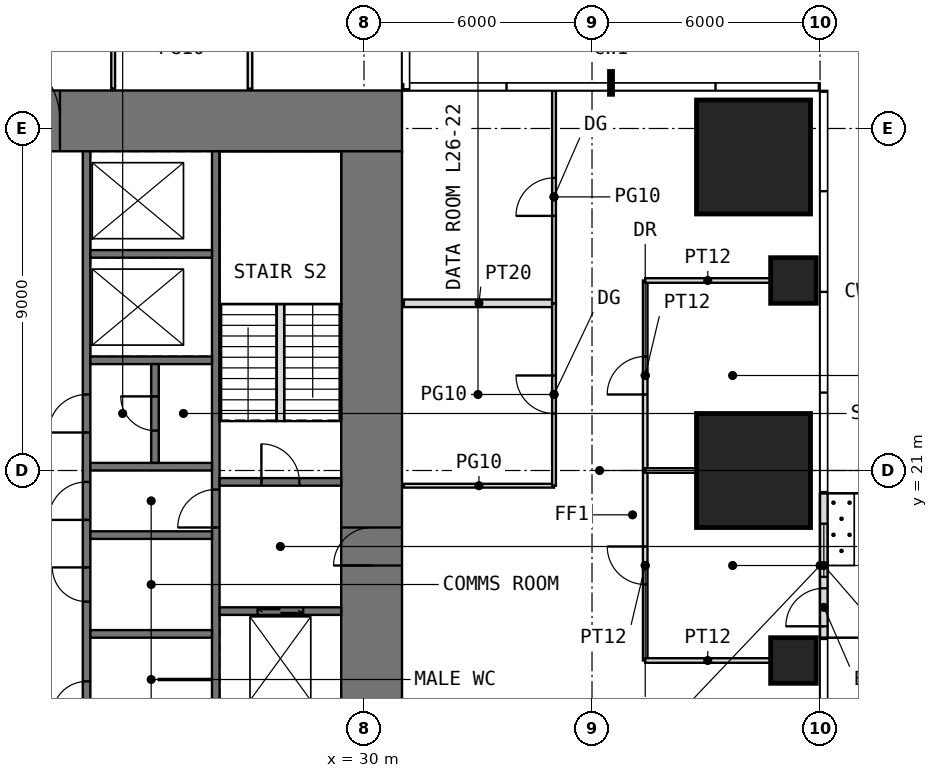
"""IFC4 building model, lengths in metres.
Left out: names, types, materials, properties, quantities, classifications, styles, units other than length and angle.
Written with IfcOpenShell. Run it as: python <this file> out.ifc"""

import sys

from ifc_helpers import new_model, si_unit, direction, frame, frame_2d, origin, origin_2d, place, context, subcontext, project, spatial, rectangle, extrude, element, fill, save


model = new_model("IFC4")
c1 = context("Model", 3, precision=1e-05, world=origin(), true_north=direction((0.0, 1.0)))
c2 = subcontext(c1, "Body", "Model", "MODEL_VIEW")
j1 = project(units=[si_unit("LENGTHUNIT", "METRE"), si_unit("PLANEANGLEUNIT", "RADIAN")], contexts=[c1])
p1 = place(None, origin())
s1 = spatial("IfcSite", under=j1, at=p1, CompositionType="ELEMENT")
p2 = place(p1, origin())
s2 = spatial("IfcBuilding", under=s1, at=p2, CompositionType="ELEMENT")
p3 = place(p2, frame((0.0, 0.0, 112.5)))
s3 = spatial("IfcBuildingStorey", under=s2, at=p3, CompositionType="ELEMENT", Elevation=112.5)
p4 = place(p3, frame((41.3, 16.0, 0.0), z_axis=(0.0, 0.0, 1.0), x_axis=(1.0, 0.0, 0.0)))
e1 = element("IfcColumn", 1, at=p4, inside=s3, PredefinedType="COLUMN", context=c2, shape_type="SweptSolid", body=[
    extrude(rectangle(XDim=1.2, YDim=1.2, at=origin_2d()), origin(), (0.0, 0.0, 1.0), 4.0),
])
p5 = place(p3, frame((40.25, 21.0, 0.0), z_axis=(0.0, 0.0, 1.0), x_axis=(1.0, 0.0, 0.0)))
e2 = element("IfcColumn", 2, at=p5, inside=s3, PredefinedType="COLUMN", context=c2, shape_type="SweptSolid", body=[
    extrude(rectangle(XDim=3.0, YDim=3.0, at=origin_2d()), origin(), (0.0, 0.0, 1.0), 4.0),
])
p6 = place(p3, frame((41.3, 26.0, 0.0), z_axis=(0.0, 0.0, 1.0), x_axis=(1.0, 0.0, 0.0)))
e3 = element("IfcColumn", 3, at=p6, inside=s3, PredefinedType="COLUMN", context=c2, shape_type="SweptSolid", body=[
    extrude(rectangle(XDim=1.2, YDim=1.2, at=origin_2d()), origin(), (0.0, 0.0, 1.0), 4.0),
])
p7 = place(p3, frame((40.25, 29.25, 0.0), z_axis=(0.0, 0.0, 1.0), x_axis=(1.0, 0.0, 0.0)))
e4 = element("IfcColumn", 4, at=p7, inside=s3, PredefinedType="COLUMN", context=c2, shape_type="SweptSolid", body=[
    extrude(rectangle(XDim=3.0, YDim=3.0, at=origin_2d()), origin(), (0.0, 0.0, 1.0), 4.0),
])
p8 = place(p3, frame((42.1, 16.6, 0.0), z_axis=(0.0, 0.0, 1.0), x_axis=(0.0, 1.0, 0.0)))
e5 = element("IfcWall", 5, at=p8, inside=s3, PredefinedType="USERDEFINED", context=c2, shape_type="SweptSolid", body=[
    extrude(rectangle(XDim=3.8, YDim=0.2, at=frame_2d((1.9, 0.0))), origin(), (0.0, 0.0, 1.0), 3.75),
])
p9 = place(p8, frame((0.3, 0.0, 0.0)))
e6 = element("IfcOpeningElement", 6, at=p9, cuts=e5, PredefinedType="OPENING", context=c2, shape_type="SweptSolid", body=[
    extrude(rectangle(XDim=1.0, YDim=2.4, at=frame_2d((0.5, 1.2))), frame((0.0, 0.11, 0.0), z_axis=(0.0, -1.0, 0.0), x_axis=(1.0, 0.0, 0.0)), (0.0, 0.0, 1.0), 0.22),
])
p10 = place(p8, frame((1.6, 0.0, 0.3)))
e7 = element("IfcOpeningElement", 7, at=p10, cuts=e5, PredefinedType="OPENING", context=c2, shape_type="SweptSolid", body=[
    extrude(rectangle(XDim=1.4, YDim=2.7, at=frame_2d((0.7, 1.35))), frame((0.0, 0.11, 0.0), z_axis=(0.0, -1.0, 0.0), x_axis=(1.0, 0.0, 0.0)), (0.0, 0.0, 1.0), 0.22),
])
p11 = place(p3, frame((11.0, 30.2, -0.05), z_axis=(0.0, 0.0, 1.0), x_axis=(1.0, 0.0, 0.0)))
e8 = element("IfcWall", 8, at=p11, inside=s3, PredefinedType="SHEAR", context=c2, shape_type="SweptSolid", body=[
    extrude(rectangle(XDim=20.0, YDim=1.6, at=frame_2d((10.0, 0.0))), origin(), (0.0, 0.0, 1.0), 4.0),
])
p12 = place(p11, frame((9.0, 0.0, 0.05)))
e9 = element("IfcOpeningElement", 9, at=p12, cuts=e8, PredefinedType="OPENING", context=c2, shape_type="SweptSolid", body=[
    extrude(rectangle(XDim=2.0, YDim=2.2, at=frame_2d((1.0, 1.1))), frame((0.0, 0.81, 0.0), z_axis=(0.0, -1.0, 0.0), x_axis=(1.0, 0.0, 0.0)), (0.0, 0.0, 1.0), 1.62),
])
p13 = place(p3, frame((30.2, 12.6, -0.05), z_axis=(0.0, 0.0, 1.0), x_axis=(0.0, 1.0, 0.0)))
e10 = element("IfcWall", 10, at=p13, inside=s3, PredefinedType="SHEAR", context=c2, shape_type="SweptSolid", body=[
    extrude(rectangle(XDim=16.8, YDim=1.6, at=frame_2d((8.4, 0.0))), origin(), (0.0, 0.0, 1.0), 4.0),
])
p14 = place(p13, frame((5.9, 0.0, 0.05)))
e11 = element("IfcOpeningElement", 11, at=p14, cuts=e10, PredefinedType="OPENING", context=c2, shape_type="SweptSolid", body=[
    extrude(rectangle(XDim=1.0, YDim=2.2, at=frame_2d((0.5, 1.1))), frame((0.0, 0.81, 0.0), z_axis=(0.0, -1.0, 0.0), x_axis=(1.0, 0.0, 0.0)), (0.0, 0.0, 1.0), 1.62),
])
p15 = place(p3, frame((22.7, 12.6, -0.05), z_axis=(0.0, 0.0, 1.0), x_axis=(0.0, 1.0, 0.0)))
e12 = element("IfcWall", 12, at=p15, inside=s3, PredefinedType="SHEAR", context=c2, shape_type="SweptSolid", body=[
    extrude(rectangle(XDim=16.8, YDim=0.2, at=frame_2d((8.4, 0.0))), origin(), (0.0, 0.0, 1.0), 4.0),
])
p16 = place(p15, frame((0.45, 0.0, 0.05)))
e13 = element("IfcOpeningElement", 13, at=p16, cuts=e12, PredefinedType="OPENING", context=c2, shape_type="SweptSolid", body=[
    extrude(rectangle(XDim=0.9, YDim=2.2, at=frame_2d((0.45, 1.1))), frame((0.0, 0.11, 0.0), z_axis=(0.0, -1.0, 0.0), x_axis=(1.0, 0.0, 0.0)), (0.0, 0.0, 1.0), 0.22),
])
p17 = place(p15, frame((7.1, 0.0, 0.05)))
e14 = element("IfcOpeningElement", 14, at=p17, cuts=e12, PredefinedType="OPENING", context=c2, shape_type="SweptSolid", body=[
    extrude(rectangle(XDim=1.0, YDim=2.2, at=frame_2d((0.5, 1.1))), frame((0.0, 0.11, 0.0), z_axis=(0.0, -1.0, 0.0), x_axis=(1.0, 0.0, 0.0)), (0.0, 0.0, 1.0), 0.22),
])
p18 = place(p15, frame((1.95, 0.0, 0.05)))
e15 = element("IfcOpeningElement", 15, at=p18, cuts=e12, PredefinedType="OPENING", context=c2, shape_type="SweptSolid", body=[
    extrude(rectangle(XDim=0.9, YDim=2.2, at=frame_2d((0.45, 1.1))), frame((0.0, 0.11, 0.0), z_axis=(0.0, -1.0, 0.0), x_axis=(1.0, 0.0, 0.0)), (0.0, 0.0, 1.0), 0.22),
])
p19 = place(p15, frame((4.95, 0.0, 0.05)))
e16 = element("IfcOpeningElement", 16, at=p19, cuts=e12, PredefinedType="OPENING", context=c2, shape_type="SweptSolid", body=[
    extrude(rectangle(XDim=0.9, YDim=2.2, at=frame_2d((0.45, 1.1))), frame((0.0, 0.11, 0.0), z_axis=(0.0, -1.0, 0.0), x_axis=(1.0, 0.0, 0.0)), (0.0, 0.0, 1.0), 0.22),
])
p20 = place(p15, frame((9.4, 0.0, 0.05)))
e17 = element("IfcOpeningElement", 17, at=p20, cuts=e12, PredefinedType="OPENING", context=c2, shape_type="SweptSolid", body=[
    extrude(rectangle(XDim=1.0, YDim=2.2, at=frame_2d((0.5, 1.1))), frame((0.0, 0.11, 0.0), z_axis=(0.0, -1.0, 0.0), x_axis=(1.0, 0.0, 0.0)), (0.0, 0.0, 1.0), 0.22),
])
p21 = place(p3, frame((26.1, 12.6, -0.05), z_axis=(0.0, 0.0, 1.0), x_axis=(0.0, 1.0, 0.0)))
e18 = element("IfcWall", 18, at=p21, inside=s3, PredefinedType="SHEAR", context=c2, shape_type="SweptSolid", body=[
    extrude(rectangle(XDim=16.8, YDim=0.2, at=frame_2d((8.4, 0.0))), origin(), (0.0, 0.0, 1.0), 4.0),
])
p22 = place(p21, frame((6.9, 0.0, 0.05)))
e19 = element("IfcOpeningElement", 19, at=p22, cuts=e18, PredefinedType="OPENING", context=c2, shape_type="SweptSolid", body=[
    extrude(rectangle(XDim=1.0, YDim=2.2, at=frame_2d((0.5, 1.1))), frame((0.0, 0.11, 0.0), z_axis=(0.0, -1.0, 0.0), x_axis=(1.0, 0.0, 0.0)), (0.0, 0.0, 1.0), 0.22),
])
for number, where, z_axis, x_axis in (
    (20, (22.8, 16.7, -0.05), (0.0, 0.0, 1.0), (1.0, 0.0, 0.0)),
    (21, (22.8, 19.3, -0.05), (0.0, 0.0, 1.0), (1.0, 0.0, 0.0)),
    (22, (22.8, 21.1, -0.05), (0.0, 0.0, 1.0), (1.0, 0.0, 0.0)),
    (23, (22.8, 23.9, -0.05), (0.0, 0.0, 1.0), (1.0, 0.0, 0.0)),
    (24, (22.8, 26.7, -0.05), (0.0, 0.0, 1.0), (1.0, 0.0, 0.0)),
):
    element("IfcWall", number, at=place(p3, frame(where, z_axis=z_axis, x_axis=x_axis)), inside=s3, PredefinedType="SHEAR", context=c2, shape_type="SweptSolid", body=[
        extrude(rectangle(XDim=3.2, YDim=0.2, at=frame_2d((1.6, 0.0))), origin(), (0.0, 0.0, 1.0), 4.0),
    ])
p23 = place(p3, frame((26.2, 17.3, -0.05), z_axis=(0.0, 0.0, 1.0), x_axis=(1.0, 0.0, 0.0)))
e25 = element("IfcWall", 25, at=p23, inside=s3, PredefinedType="SHEAR", context=c2, shape_type="SweptSolid", body=[
    extrude(rectangle(XDim=3.2, YDim=0.2, at=frame_2d((1.6, 0.0))), origin(), (0.0, 0.0, 1.0), 4.0),
])
p24 = place(p23, frame((1.0, 0.0, 0.05)))
e26 = element("IfcOpeningElement", 26, at=p24, cuts=e25, PredefinedType="OPENING", context=c2, shape_type="SweptSolid", body=[
    extrude(rectangle(XDim=1.2, YDim=2.2, at=frame_2d((0.6, 1.1))), frame((0.0, 0.11, 0.0), z_axis=(0.0, -1.0, 0.0), x_axis=(1.0, 0.0, 0.0)), (0.0, 0.0, 1.0), 0.22),
])
p25 = place(p3, frame((26.2, 20.7, -0.05), z_axis=(0.0, 0.0, 1.0), x_axis=(1.0, 0.0, 0.0)))
e27 = element("IfcWall", 27, at=p25, inside=s3, PredefinedType="SHEAR", context=c2, shape_type="SweptSolid", body=[
    extrude(rectangle(XDim=3.2, YDim=0.2, at=frame_2d((1.6, 0.0))), origin(), (0.0, 0.0, 1.0), 4.0),
])
p26 = place(p25, frame((1.1, 0.0, 0.05)))
e28 = element("IfcOpeningElement", 28, at=p26, cuts=e27, PredefinedType="OPENING", context=c2, shape_type="SweptSolid", body=[
    extrude(rectangle(XDim=1.0, YDim=2.2, at=frame_2d((0.5, 1.1))), frame((0.0, 0.11, 0.0), z_axis=(0.0, -1.0, 0.0), x_axis=(1.0, 0.0, 0.0)), (0.0, 0.0, 1.0), 0.22),
])
p27 = place(p3, frame((24.6, 15.5, 0.0), z_axis=(0.0, 0.0, 1.0), x_axis=(1.0, 0.0, 0.0)))
e29 = element("IfcWall", 29, at=p27, inside=s3, PredefinedType="PARTITIONING", context=c2, shape_type="SweptSolid", body=[
    extrude(rectangle(XDim=1.4, YDim=0.03, at=frame_2d((0.7, 0.0))), origin(), (0.0, 0.0, 1.0), 3.75),
])
p28 = place(p3, frame((24.5, 21.2, -0.05), z_axis=(0.0, 0.0, 1.0), x_axis=(0.0, 1.0, 0.0)))
e30 = element("IfcWall", 30, at=p28, inside=s3, PredefinedType="SHEAR", context=c2, shape_type="SweptSolid", body=[
    extrude(rectangle(XDim=2.6, YDim=0.2, at=frame_2d((1.3, 0.0))), origin(), (0.0, 0.0, 1.0), 4.0),
])
p29 = place(p28, frame((0.85, 0.0, 0.05)))
e31 = element("IfcOpeningElement", 31, at=p29, cuts=e30, PredefinedType="OPENING", context=c2, shape_type="SweptSolid", body=[
    extrude(rectangle(XDim=0.9, YDim=2.2, at=frame_2d((0.45, 1.1))), frame((0.0, 0.11, 0.0), z_axis=(0.0, -1.0, 0.0), x_axis=(1.0, 0.0, 0.0)), (0.0, 0.0, 1.0), 0.22),
])
p30 = place(p3, frame((23.4, 31.05, 0.0), z_axis=(0.0, 0.0, 1.0), x_axis=(0.0, 1.0, 0.0)))
e32 = element("IfcWall", 32, at=p30, inside=s3, PredefinedType="PARTITIONING", context=c2, shape_type="SweptSolid", body=[
    extrude(rectangle(XDim=3.95, YDim=0.1, at=frame_2d((1.975, 0.0))), origin(), (0.0, 0.0, 1.0), 3.75),
])
p31 = place(p3, frame((27.0, 31.05, 0.0), z_axis=(0.0, 0.0, 1.0), x_axis=(0.0, 1.0, 0.0)))
e33 = element("IfcWall", 33, at=p31, inside=s3, PredefinedType="PARTITIONING", context=c2, shape_type="SweptSolid", body=[
    extrude(rectangle(XDim=3.45, YDim=0.12, at=frame_2d((1.725, 0.0))), origin(), (0.0, 0.0, 1.0), 3.75),
])
p32 = place(p3, frame((31.05, 20.6, 0.0), z_axis=(0.0, 0.0, 1.0), x_axis=(1.0, 0.0, 0.0)))
e34 = element("IfcWall", 34, at=p32, inside=s3, PredefinedType="PARTITIONING", context=c2, shape_type="SweptSolid", body=[
    extrude(rectangle(XDim=3.95, YDim=0.1, at=frame_2d((1.975, 0.0))), origin(), (0.0, 0.0, 1.0), 3.75),
])
p33 = place(p3, frame((31.05, 25.4, 0.0), z_axis=(0.0, 0.0, 1.0), x_axis=(1.0, 0.0, 0.0)))
e35 = element("IfcWall", 35, at=p33, inside=s3, PredefinedType="PARTITIONING", context=c2, shape_type="SweptSolid", body=[
    extrude(rectangle(XDim=3.95, YDim=0.2, at=frame_2d((1.975, 0.0))), origin(), (0.0, 0.0, 1.0), 3.75),
])
p34 = place(p3, frame((35.0, 20.6, 0.0), z_axis=(0.0, 0.0, 1.0), x_axis=(0.0, 1.0, 0.0)))
e36 = element("IfcWall", 36, at=p34, inside=s3, PredefinedType="PARTITIONING", context=c2, shape_type="SweptSolid", body=[
    extrude(rectangle(XDim=4.8, YDim=0.1, at=frame_2d((2.4, 0.0))), origin(), (0.0, 0.0, 1.0), 3.75),
])
p35 = place(p34, frame((1.9, 0.0, 0.0)))
e37 = element("IfcOpeningElement", 37, at=p35, cuts=e36, PredefinedType="OPENING", context=c2, shape_type="SweptSolid", body=[
    extrude(rectangle(XDim=1.0, YDim=2.4, at=frame_2d((0.5, 1.2))), frame((0.0, 0.06, 0.0), z_axis=(0.0, -1.0, 0.0), x_axis=(1.0, 0.0, 0.0)), (0.0, 0.0, 1.0), 0.12),
])
p36 = place(p3, frame((35.0, 25.4, 0.0), z_axis=(0.0, 0.0, 1.0), x_axis=(0.0, 1.0, 0.0)))
e38 = element("IfcWall", 38, at=p36, inside=s3, PredefinedType="PARTITIONING", context=c2, shape_type="SweptSolid", body=[
    extrude(rectangle(XDim=5.6, YDim=0.1, at=frame_2d((2.8, 0.0))), origin(), (0.0, 0.0, 1.0), 3.75),
])
p37 = place(p36, frame((2.3, 0.0, 0.0)))
e39 = element("IfcOpeningElement", 39, at=p37, cuts=e38, PredefinedType="OPENING", context=c2, shape_type="SweptSolid", body=[
    extrude(rectangle(XDim=1.0, YDim=2.4, at=frame_2d((0.5, 1.2))), frame((0.0, 0.06, 0.0), z_axis=(0.0, -1.0, 0.0), x_axis=(1.0, 0.0, 0.0)), (0.0, 0.0, 1.0), 0.12),
])
p38 = place(p3, frame((37.4, 16.0, 0.0), z_axis=(0.0, 0.0, 1.0), x_axis=(0.0, 1.0, 0.0)))
e40 = element("IfcWall", 40, at=p38, inside=s3, PredefinedType="PARTITIONING", context=c2, shape_type="SweptSolid", body=[
    extrude(rectangle(XDim=5.0, YDim=0.12, at=frame_2d((2.5, 0.0))), origin(), (0.0, 0.0, 1.0), 3.75),
])
p39 = place(p38, frame((2.0, 0.0, 0.0)))
e41 = element("IfcOpeningElement", 41, at=p39, cuts=e40, PredefinedType="OPENING", context=c2, shape_type="SweptSolid", body=[
    extrude(rectangle(XDim=1.0, YDim=2.2, at=frame_2d((0.5, 1.1))), frame((0.0, 0.07, 0.0), z_axis=(0.0, -1.0, 0.0), x_axis=(1.0, 0.0, 0.0)), (0.0, 0.0, 1.0), 0.14),
])
p40 = place(p3, frame((37.4, 16.0, 0.0), z_axis=(0.0, 0.0, 1.0), x_axis=(1.0, 0.0, 0.0)))
e42 = element("IfcWall", 42, at=p40, inside=s3, PredefinedType="PARTITIONING", context=c2, shape_type="SweptSolid", body=[
    extrude(rectangle(XDim=3.29, YDim=0.12, at=frame_2d((1.645, 0.0))), origin(), (0.0, 0.0, 1.0), 3.75),
])
p41 = place(p3, frame((37.4, 21.0, 0.0), z_axis=(0.0, 0.0, 1.0), x_axis=(0.0, 1.0, 0.0)))
e43 = element("IfcWall", 43, at=p41, inside=s3, PredefinedType="PARTITIONING", context=c2, shape_type="SweptSolid", body=[
    extrude(rectangle(XDim=5.0, YDim=0.12, at=frame_2d((2.5, 0.0))), origin(), (0.0, 0.0, 1.0), 3.75),
])
p42 = place(p41, frame((2.0, 0.0, 0.0)))
e44 = element("IfcOpeningElement", 44, at=p42, cuts=e43, PredefinedType="OPENING", context=c2, shape_type="SweptSolid", body=[
    extrude(rectangle(XDim=1.0, YDim=2.2, at=frame_2d((0.5, 1.1))), frame((0.0, 0.07, 0.0), z_axis=(0.0, -1.0, 0.0), x_axis=(1.0, 0.0, 0.0)), (0.0, 0.0, 1.0), 0.14),
])
p43 = place(p3, frame((37.4, 21.0, 0.0), z_axis=(0.0, 0.0, 1.0), x_axis=(1.0, 0.0, 0.0)))
e45 = element("IfcWall", 45, at=p43, inside=s3, PredefinedType="PARTITIONING", context=c2, shape_type="SweptSolid", body=[
    extrude(rectangle(XDim=1.34, YDim=0.12, at=frame_2d((0.67, 0.0))), origin(), (0.0, 0.0, 1.0), 3.75),
])
p44 = place(p3, frame((37.4, 26.0, 0.0), z_axis=(0.0, 0.0, 1.0), x_axis=(1.0, 0.0, 0.0)))
e46 = element("IfcWall", 46, at=p44, inside=s3, PredefinedType="PARTITIONING", context=c2, shape_type="SweptSolid", body=[
    extrude(rectangle(XDim=3.29, YDim=0.12, at=frame_2d((1.645, 0.0))), origin(), (0.0, 0.0, 1.0), 3.75),
])
p45 = place(p3, frame((27.8, 22.3, 0.0), z_axis=(0.0, 0.0, 1.0), x_axis=(0.0, 1.0, 0.0)))
e47 = element("IfcWall", 47, at=p45, inside=s3, PredefinedType="PARTITIONING", context=c2, shape_type="SweptSolid", body=[
    extrude(rectangle(XDim=3.08, YDim=0.2, at=frame_2d((1.54, 0.0))), origin(), (0.0, 0.0, 1.0), 4.0),
])
p46 = place(p9, origin())
e48 = element("IfcDoor", 48, at=p46, inside=s3, OperationType="SINGLE_SWING_LEFT", PredefinedType="DOOR", context=c2, shape_type="SweptSolid", body=[
    extrude(rectangle(XDim=1.0, YDim=2.4, at=frame_2d((0.5, 1.2))), frame((0.0, 0.025, 0.0), z_axis=(0.0, -1.0, 0.0), x_axis=(1.0, 0.0, 0.0)), (0.0, 0.0, 1.0), 0.05),
])
fill(e6, e48)
p47 = place(p10, origin())
e49 = element("IfcWindow", 49, at=p47, inside=s3, PartitioningType="SINGLE_PANEL", PredefinedType="WINDOW", context=c2, shape_type="SweptSolid", body=[
    extrude(rectangle(XDim=1.4, YDim=2.7, at=frame_2d((0.7, 1.35))), frame((0.0, 0.03, 0.0), z_axis=(0.0, -1.0, 0.0), x_axis=(1.0, 0.0, 0.0)), (0.0, 0.0, 1.0), 0.06),
])
fill(e7, e49)
p48 = place(p12, origin())
e50 = element("IfcDoor", 50, at=p48, inside=s3, OperationType="DOUBLE_DOOR_SINGLE_SWING", PredefinedType="DOOR", context=c2, shape_type="SweptSolid", body=[
    extrude(rectangle(XDim=2.0, YDim=2.2, at=frame_2d((1.0, 1.1))), frame((0.0, 0.025, 0.0), z_axis=(0.0, -1.0, 0.0), x_axis=(1.0, 0.0, 0.0)), (0.0, 0.0, 1.0), 0.05),
])
fill(e9, e50)
p49 = place(p14, origin())
e51 = element("IfcDoor", 51, at=p49, inside=s3, OperationType="SINGLE_SWING_LEFT", PredefinedType="DOOR", context=c2, shape_type="SweptSolid", body=[
    extrude(rectangle(XDim=1.0, YDim=2.2, at=frame_2d((0.5, 1.1))), frame((0.0, 0.025, 0.0), z_axis=(0.0, -1.0, 0.0), x_axis=(1.0, 0.0, 0.0)), (0.0, 0.0, 1.0), 0.05),
])
fill(e11, e51)
p50 = place(p26, origin())
e52 = element("IfcDoor", 52, at=p50, inside=s3, OperationType="SINGLE_SWING_LEFT", PredefinedType="DOOR", context=c2, shape_type="SweptSolid", body=[
    extrude(rectangle(XDim=1.0, YDim=2.2, at=frame_2d((0.5, 1.1))), frame((0.0, 0.025, 0.0), z_axis=(0.0, -1.0, 0.0), x_axis=(1.0, 0.0, 0.0)), (0.0, 0.0, 1.0), 0.05),
])
fill(e28, e52)
p51 = place(p22, origin())
e53 = element("IfcDoor", 53, at=p51, inside=s3, OperationType="SINGLE_SWING_LEFT", PredefinedType="DOOR", context=c2, shape_type="SweptSolid", body=[
    extrude(rectangle(XDim=1.0, YDim=2.2, at=frame_2d((0.5, 1.1))), frame((0.0, 0.025, 0.0), z_axis=(0.0, -1.0, 0.0), x_axis=(1.0, 0.0, 0.0)), (0.0, 0.0, 1.0), 0.05),
])
fill(e19, e53)
p52 = place(p17, origin())
e54 = element("IfcDoor", 54, at=p52, inside=s3, OperationType="SINGLE_SWING_LEFT", PredefinedType="DOOR", context=c2, shape_type="SweptSolid", body=[
    extrude(rectangle(XDim=1.0, YDim=2.2, at=frame_2d((0.5, 1.1))), frame((0.0, 0.025, 0.0), z_axis=(0.0, -1.0, 0.0), x_axis=(1.0, 0.0, 0.0)), (0.0, 0.0, 1.0), 0.05),
])
fill(e14, e54)
p53 = place(p18, origin())
e55 = element("IfcDoor", 55, at=p53, inside=s3, OperationType="SINGLE_SWING_LEFT", PredefinedType="DOOR", context=c2, shape_type="SweptSolid", body=[
    extrude(rectangle(XDim=0.9, YDim=2.2, at=frame_2d((0.45, 1.1))), frame((0.0, 0.025, 0.0), z_axis=(0.0, -1.0, 0.0), x_axis=(1.0, 0.0, 0.0)), (0.0, 0.0, 1.0), 0.05),
])
fill(e15, e55)
p54 = place(p19, origin())
e56 = element("IfcDoor", 56, at=p54, inside=s3, OperationType="SINGLE_SWING_RIGHT", PredefinedType="DOOR", context=c2, shape_type="SweptSolid", body=[
    extrude(rectangle(XDim=0.9, YDim=2.2, at=frame_2d((0.45, 1.1))), frame((0.0, 0.025, 0.0), z_axis=(0.0, -1.0, 0.0), x_axis=(1.0, 0.0, 0.0)), (0.0, 0.0, 1.0), 0.05),
])
fill(e16, e56)
p55 = place(p20, origin())
e57 = element("IfcDoor", 57, at=p55, inside=s3, OperationType="SINGLE_SWING_LEFT", PredefinedType="DOOR", context=c2, shape_type="SweptSolid", body=[
    extrude(rectangle(XDim=1.0, YDim=2.2, at=frame_2d((0.5, 1.1))), frame((0.0, 0.025, 0.0), z_axis=(0.0, -1.0, 0.0), x_axis=(1.0, 0.0, 0.0)), (0.0, 0.0, 1.0), 0.05),
])
fill(e17, e57)
p56 = place(p29, origin())
e58 = element("IfcDoor", 58, at=p56, inside=s3, OperationType="SINGLE_SWING_RIGHT", PredefinedType="DOOR", context=c2, shape_type="SweptSolid", body=[
    extrude(rectangle(XDim=0.9, YDim=2.2, at=frame_2d((0.45, 1.1))), frame((0.0, 0.025, 0.0), z_axis=(0.0, -1.0, 0.0), x_axis=(1.0, 0.0, 0.0)), (0.0, 0.0, 1.0), 0.05),
])
fill(e31, e58)
p57 = place(p35, origin())
e59 = element("IfcDoor", 59, at=p57, inside=s3, OperationType="SINGLE_SWING_RIGHT", PredefinedType="DOOR", context=c2, shape_type="SweptSolid", body=[
    extrude(rectangle(XDim=1.0, YDim=2.4, at=frame_2d((0.5, 1.2))), frame((0.0, 0.025, 0.0), z_axis=(0.0, -1.0, 0.0), x_axis=(1.0, 0.0, 0.0)), (0.0, 0.0, 1.0), 0.05),
])
fill(e37, e59)
p58 = place(p37, origin())
e60 = element("IfcDoor", 60, at=p58, inside=s3, OperationType="SINGLE_SWING_LEFT", PredefinedType="DOOR", context=c2, shape_type="SweptSolid", body=[
    extrude(rectangle(XDim=1.0, YDim=2.4, at=frame_2d((0.5, 1.2))), frame((0.0, 0.025, 0.0), z_axis=(0.0, -1.0, 0.0), x_axis=(1.0, 0.0, 0.0)), (0.0, 0.0, 1.0), 0.05),
])
fill(e39, e60)
p59 = place(p39, origin())
e61 = element("IfcDoor", 61, at=p59, inside=s3, OperationType="SINGLE_SWING_RIGHT", PredefinedType="DOOR", context=c2, shape_type="SweptSolid", body=[
    extrude(rectangle(XDim=1.0, YDim=2.2, at=frame_2d((0.5, 1.1))), frame((0.0, 0.025, 0.0), z_axis=(0.0, -1.0, 0.0), x_axis=(1.0, 0.0, 0.0)), (0.0, 0.0, 1.0), 0.05),
])
fill(e41, e61)
p60 = place(p42, origin())
e62 = element("IfcDoor", 62, at=p60, inside=s3, OperationType="SINGLE_SWING_LEFT", PredefinedType="DOOR", context=c2, shape_type="SweptSolid", body=[
    extrude(rectangle(XDim=1.0, YDim=2.2, at=frame_2d((0.5, 1.1))), frame((0.0, 0.025, 0.0), z_axis=(0.0, -1.0, 0.0), x_axis=(1.0, 0.0, 0.0)), (0.0, 0.0, 1.0), 0.05),
])
fill(e44, e62)
p61 = place(p24, origin())
e63 = element("IfcDoor", 63, at=p61, inside=s3, OperationType="DOUBLE_DOOR_SLIDING", PredefinedType="DOOR", context=c2, shape_type="SweptSolid", body=[
    extrude(rectangle(XDim=1.2, YDim=2.2, at=frame_2d((0.6, 1.1))), frame((0.0, 0.025, 0.0), z_axis=(0.0, -1.0, 0.0), x_axis=(1.0, 0.0, 0.0)), (0.0, 0.0, 1.0), 0.05),
])
fill(e26, e63)
save(model, sys.argv[1])
